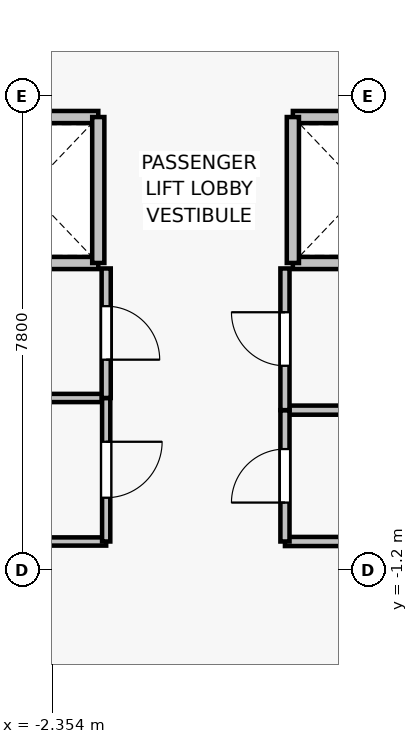
"""IFC4 building model, lengths in metres.
Left out: names, types, materials, properties, quantities, classifications, styles, units other than length and angle.
Written with IfcOpenShell. Run it as: python <this file> out.ifc"""

import sys

from ifc_helpers import new_model, si_unit, direction, frame, frame_2d, origin, place, context, subcontext, project, spatial, rectangle, extrude, source, transform, mapped, element, fill, save


model = new_model("IFC4")
c1 = context("Model", 3, precision=1e-05, world=origin(), true_north=direction((0.0, 1.0)))
c2 = subcontext(c1, "Body", "Model", "MODEL_VIEW")
j1 = project(units=[si_unit("LENGTHUNIT", "METRE"), si_unit("PLANEANGLEUNIT", "RADIAN")], contexts=[c1])
p1 = place(None, origin())
s1 = spatial("IfcSite", under=j1, at=p1, CompositionType="ELEMENT")
p2 = place(p1, origin())
s2 = spatial("IfcBuilding", under=s1, at=p2, CompositionType="ELEMENT")
p3 = place(p2, frame((0.0, 0.0, 27.4)))
s3 = spatial("IfcBuildingStorey", under=s2, at=p3, CompositionType="ELEMENT", Elevation=27.4)
for number, where, z_axis, x_axis in (
    (1, (-1.6, 3.85, 0.0), (0.0, 0.0, 1.0), (-1.0, 0.0, 0.0)),
    (2, (-3.9, 6.25, 0.0), (0.0, 0.0, 1.0), (1.0, 0.0, 0.0)),
):
    element("IfcWall", number, at=place(p3, frame(where, z_axis=z_axis, x_axis=x_axis)), inside=s3, PredefinedType="SOLIDWALL", context=c2, shape_type="SweptSolid", body=[
        extrude(rectangle(XDim=2.3, YDim=0.2, at=frame_2d((1.15, 0.0))), origin(), (0.0, 0.0, 1.0), 3.075),
    ])
p4 = place(p3, frame((-1.6, 6.25, 0.0), z_axis=(0.0, 0.0, 1.0), x_axis=(0.0, -1.0, 0.0)))
e3 = element("IfcWall", 3, at=p4, inside=s3, PredefinedType="SOLIDWALL", context=c2, shape_type="SweptSolid", body=[
    extrude(rectangle(XDim=2.4, YDim=0.2, at=frame_2d((1.2, 0.0))), origin(), (0.0, 0.0, 1.0), 3.075),
])
for number, where, z_axis, x_axis in (
    (4, (3.9, 3.85, 0.0), (0.0, 0.0, 1.0), (-1.0, 0.0, 0.0)),
    (5, (1.6, 6.25, 0.0), (0.0, 0.0, 1.0), (1.0, 0.0, 0.0)),
):
    element("IfcWall", number, at=place(p3, frame(where, z_axis=z_axis, x_axis=x_axis)), inside=s3, PredefinedType="SOLIDWALL", context=c2, shape_type="SweptSolid", body=[
        extrude(rectangle(XDim=2.3, YDim=0.2, at=frame_2d((1.15, 0.0))), origin(), (0.0, 0.0, 1.0), 3.075),
    ])
p5 = place(p3, frame((1.6, 3.85, 0.0), z_axis=(0.0, 0.0, 1.0), x_axis=(0.0, 1.0, 0.0)))
e6 = element("IfcWall", 6, at=p5, inside=s3, PredefinedType="SOLIDWALL", context=c2, shape_type="SweptSolid", body=[
    extrude(rectangle(XDim=2.4, YDim=0.2, at=frame_2d((1.2, 0.0))), origin(), (0.0, 0.0, 1.0), 3.075),
])
for number, where, z_axis, x_axis in (
    (7, (-1.47, -0.73, 0.0), (0.0, 0.0, 1.0), (-1.0, 0.0, 0.0)),
    (8, (-3.47, 1.63, 0.0), (0.0, 0.0, 1.0), (1.0, 0.0, 0.0)),
):
    element("IfcWall", number, at=place(p3, frame(where, z_axis=z_axis, x_axis=x_axis)), inside=s3, PredefinedType="PARTITIONING", context=c2, shape_type="SweptSolid", body=[
        extrude(rectangle(XDim=2.0, YDim=0.135, at=frame_2d((1.0, 0.0))), origin(), (0.0, 0.0, 1.0), 3.075),
    ])
p6 = place(p3, frame((-1.47, 1.63, 0.0), z_axis=(0.0, 0.0, 1.0), x_axis=(0.0, -1.0, 0.0)))
e9 = element("IfcWall", 9, at=p6, inside=s3, PredefinedType="PARTITIONING", context=c2, shape_type="SweptSolid", body=[
    extrude(rectangle(XDim=2.36, YDim=0.135, at=frame_2d((1.18, 0.0))), origin(), (0.0, 0.0, 1.0), 3.075),
])
p7 = place(p6, frame((0.72, 0.0, 0.0)))
e10 = element("IfcOpeningElement", 10, at=p7, cuts=e9, PredefinedType="OPENING", context=c2, shape_type="SweptSolid", body=[
    extrude(rectangle(XDim=0.92, YDim=2.1, at=frame_2d((0.46, 1.05))), frame((0.0, 0.077, 0.0), z_axis=(0.0, -1.0, 0.0), x_axis=(1.0, 0.0, 0.0)), (0.0, 0.0, 1.0), 0.155),
])
p8 = place(p3, frame((-1.47, 3.76, 0.0), z_axis=(0.0, 0.0, 1.0), x_axis=(0.0, -1.0, 0.0)))
e11 = element("IfcWall", 11, at=p8, inside=s3, PredefinedType="PARTITIONING", context=c2, shape_type="SweptSolid", body=[
    extrude(rectangle(XDim=2.13, YDim=0.15, at=frame_2d((1.065, 0.0))), origin(), (0.0, 0.0, 1.0), 3.075),
])
p9 = place(p8, frame((0.62, 0.0, 0.0)))
e12 = element("IfcOpeningElement", 12, at=p9, cuts=e11, PredefinedType="OPENING", context=c2, shape_type="SweptSolid", body=[
    extrude(rectangle(XDim=0.88, YDim=2.1, at=frame_2d((0.44, 1.05))), frame((0.0, 0.085, 0.0), z_axis=(0.0, -1.0, 0.0), x_axis=(1.0, 0.0, 0.0)), (0.0, 0.0, 1.0), 0.17),
])
for number, where, z_axis, x_axis in (
    (13, (3.68, -0.73, 0.0), (0.0, 0.0, 1.0), (-1.0, 0.0, 0.0)),
    (14, (1.47, 1.43, 0.0), (0.0, 0.0, 1.0), (1.0, 0.0, 0.0)),
):
    element("IfcWall", number, at=place(p3, frame(where, z_axis=z_axis, x_axis=x_axis)), inside=s3, PredefinedType="PARTITIONING", context=c2, shape_type="SweptSolid", body=[
        extrude(rectangle(XDim=2.21, YDim=0.15, at=frame_2d((1.105, 0.0))), origin(), (0.0, 0.0, 1.0), 3.075),
    ])
p10 = place(p3, frame((1.47, -0.73, 0.0), z_axis=(0.0, 0.0, 1.0), x_axis=(0.0, 1.0, 0.0)))
e15 = element("IfcWall", 15, at=p10, inside=s3, PredefinedType="PARTITIONING", context=c2, shape_type="SweptSolid", body=[
    extrude(rectangle(XDim=2.16, YDim=0.15, at=frame_2d((1.08, 0.0))), origin(), (0.0, 0.0, 1.0), 3.075),
])
p11 = place(p10, frame((0.64, 0.0, 0.0)))
e16 = element("IfcOpeningElement", 16, at=p11, cuts=e15, PredefinedType="OPENING", context=c2, shape_type="SweptSolid", body=[
    extrude(rectangle(XDim=0.88, YDim=2.1, at=frame_2d((0.44, 1.05))), frame((0.0, 0.085, 0.0), z_axis=(0.0, -1.0, 0.0), x_axis=(1.0, 0.0, 0.0)), (0.0, 0.0, 1.0), 0.17),
])
p12 = place(p3, frame((1.47, 1.43, 0.0), z_axis=(0.0, 0.0, 1.0), x_axis=(0.0, 1.0, 0.0)))
e17 = element("IfcWall", 17, at=p12, inside=s3, PredefinedType="PARTITIONING", context=c2, shape_type="SweptSolid", body=[
    extrude(rectangle(XDim=2.33, YDim=0.15, at=frame_2d((1.165, 0.0))), origin(), (0.0, 0.0, 1.0), 3.075),
])
p13 = place(p12, frame((0.73, 0.0, 0.0)))
e18 = element("IfcOpeningElement", 18, at=p13, cuts=e17, PredefinedType="OPENING", context=c2, shape_type="SweptSolid", body=[
    extrude(rectangle(XDim=0.88, YDim=2.15, at=frame_2d((0.44, 1.075))), frame((0.0, 0.085, 0.0), z_axis=(0.0, -1.0, 0.0), x_axis=(1.0, 0.0, 0.0)), (0.0, 0.0, 1.0), 0.17),
])
m1 = source(origin(), c2, "Body", "SweptSolid", [
    extrude(rectangle(XDim=0.92, YDim=2.1, at=frame_2d((0.46, 1.05))), frame((0.0, 0.025, 0.0), z_axis=(0.0, -1.0, 0.0), x_axis=(1.0, 0.0, 0.0)), (0.0, 0.0, 1.0), 0.05),
])
p14 = place(p7, origin())
e19 = element("IfcDoor", 19, at=p14, inside=s3, OperationType="SINGLE_SWING_LEFT", PredefinedType="DOOR", context=c2, shape_type="MappedRepresentation", body=[
    mapped(m1, transform((0.0, 0.0, 0.0), x_axis=(1.0, 0.0, 0.0), y_axis=(0.0, 1.0, 0.0), z_axis=(0.0, 0.0, 1.0), scale=1.0)),
])
fill(e10, e19)
m2 = source(origin(), c2, "Body", "SweptSolid", [
    extrude(rectangle(XDim=0.88, YDim=2.1, at=frame_2d((0.44, 1.05))), frame((0.0, 0.025, 0.0), z_axis=(0.0, -1.0, 0.0), x_axis=(1.0, 0.0, 0.0)), (0.0, 0.0, 1.0), 0.05),
])
p15 = place(p9, origin())
e20 = element("IfcDoor", 20, at=p15, inside=s3, OperationType="SINGLE_SWING_RIGHT", PredefinedType="DOOR", context=c2, shape_type="MappedRepresentation", body=[
    mapped(m2, transform((0.0, 0.0, 0.0), x_axis=(1.0, 0.0, 0.0), y_axis=(0.0, 1.0, 0.0), z_axis=(0.0, 0.0, 1.0), scale=1.0)),
])
fill(e12, e20)
p16 = place(p11, origin())
e21 = element("IfcDoor", 21, at=p16, inside=s3, OperationType="SINGLE_SWING_LEFT", PredefinedType="DOOR", context=c2, shape_type="MappedRepresentation", body=[
    mapped(m2, transform((0.0, 0.0, 0.0), x_axis=(1.0, 0.0, 0.0), y_axis=(0.0, 1.0, 0.0), z_axis=(0.0, 0.0, 1.0), scale=1.0)),
])
fill(e16, e21)
m3 = source(origin(), c2, "Body", "SweptSolid", [
    extrude(rectangle(XDim=0.88, YDim=2.15, at=frame_2d((0.44, 1.075))), frame((0.0, 0.025, 0.0), z_axis=(0.0, -1.0, 0.0), x_axis=(1.0, 0.0, 0.0)), (0.0, 0.0, 1.0), 0.05),
])
p17 = place(p13, origin())
e22 = element("IfcDoor", 22, at=p17, inside=s3, OperationType="SINGLE_SWING_RIGHT", PredefinedType="DOOR", context=c2, shape_type="MappedRepresentation", body=[
    mapped(m3, transform((0.0, 0.0, 0.0), x_axis=(1.0, 0.0, 0.0), y_axis=(0.0, 1.0, 0.0), z_axis=(0.0, 0.0, 1.0), scale=1.0)),
])
fill(e18, e22)
save(model, sys.argv[1])
